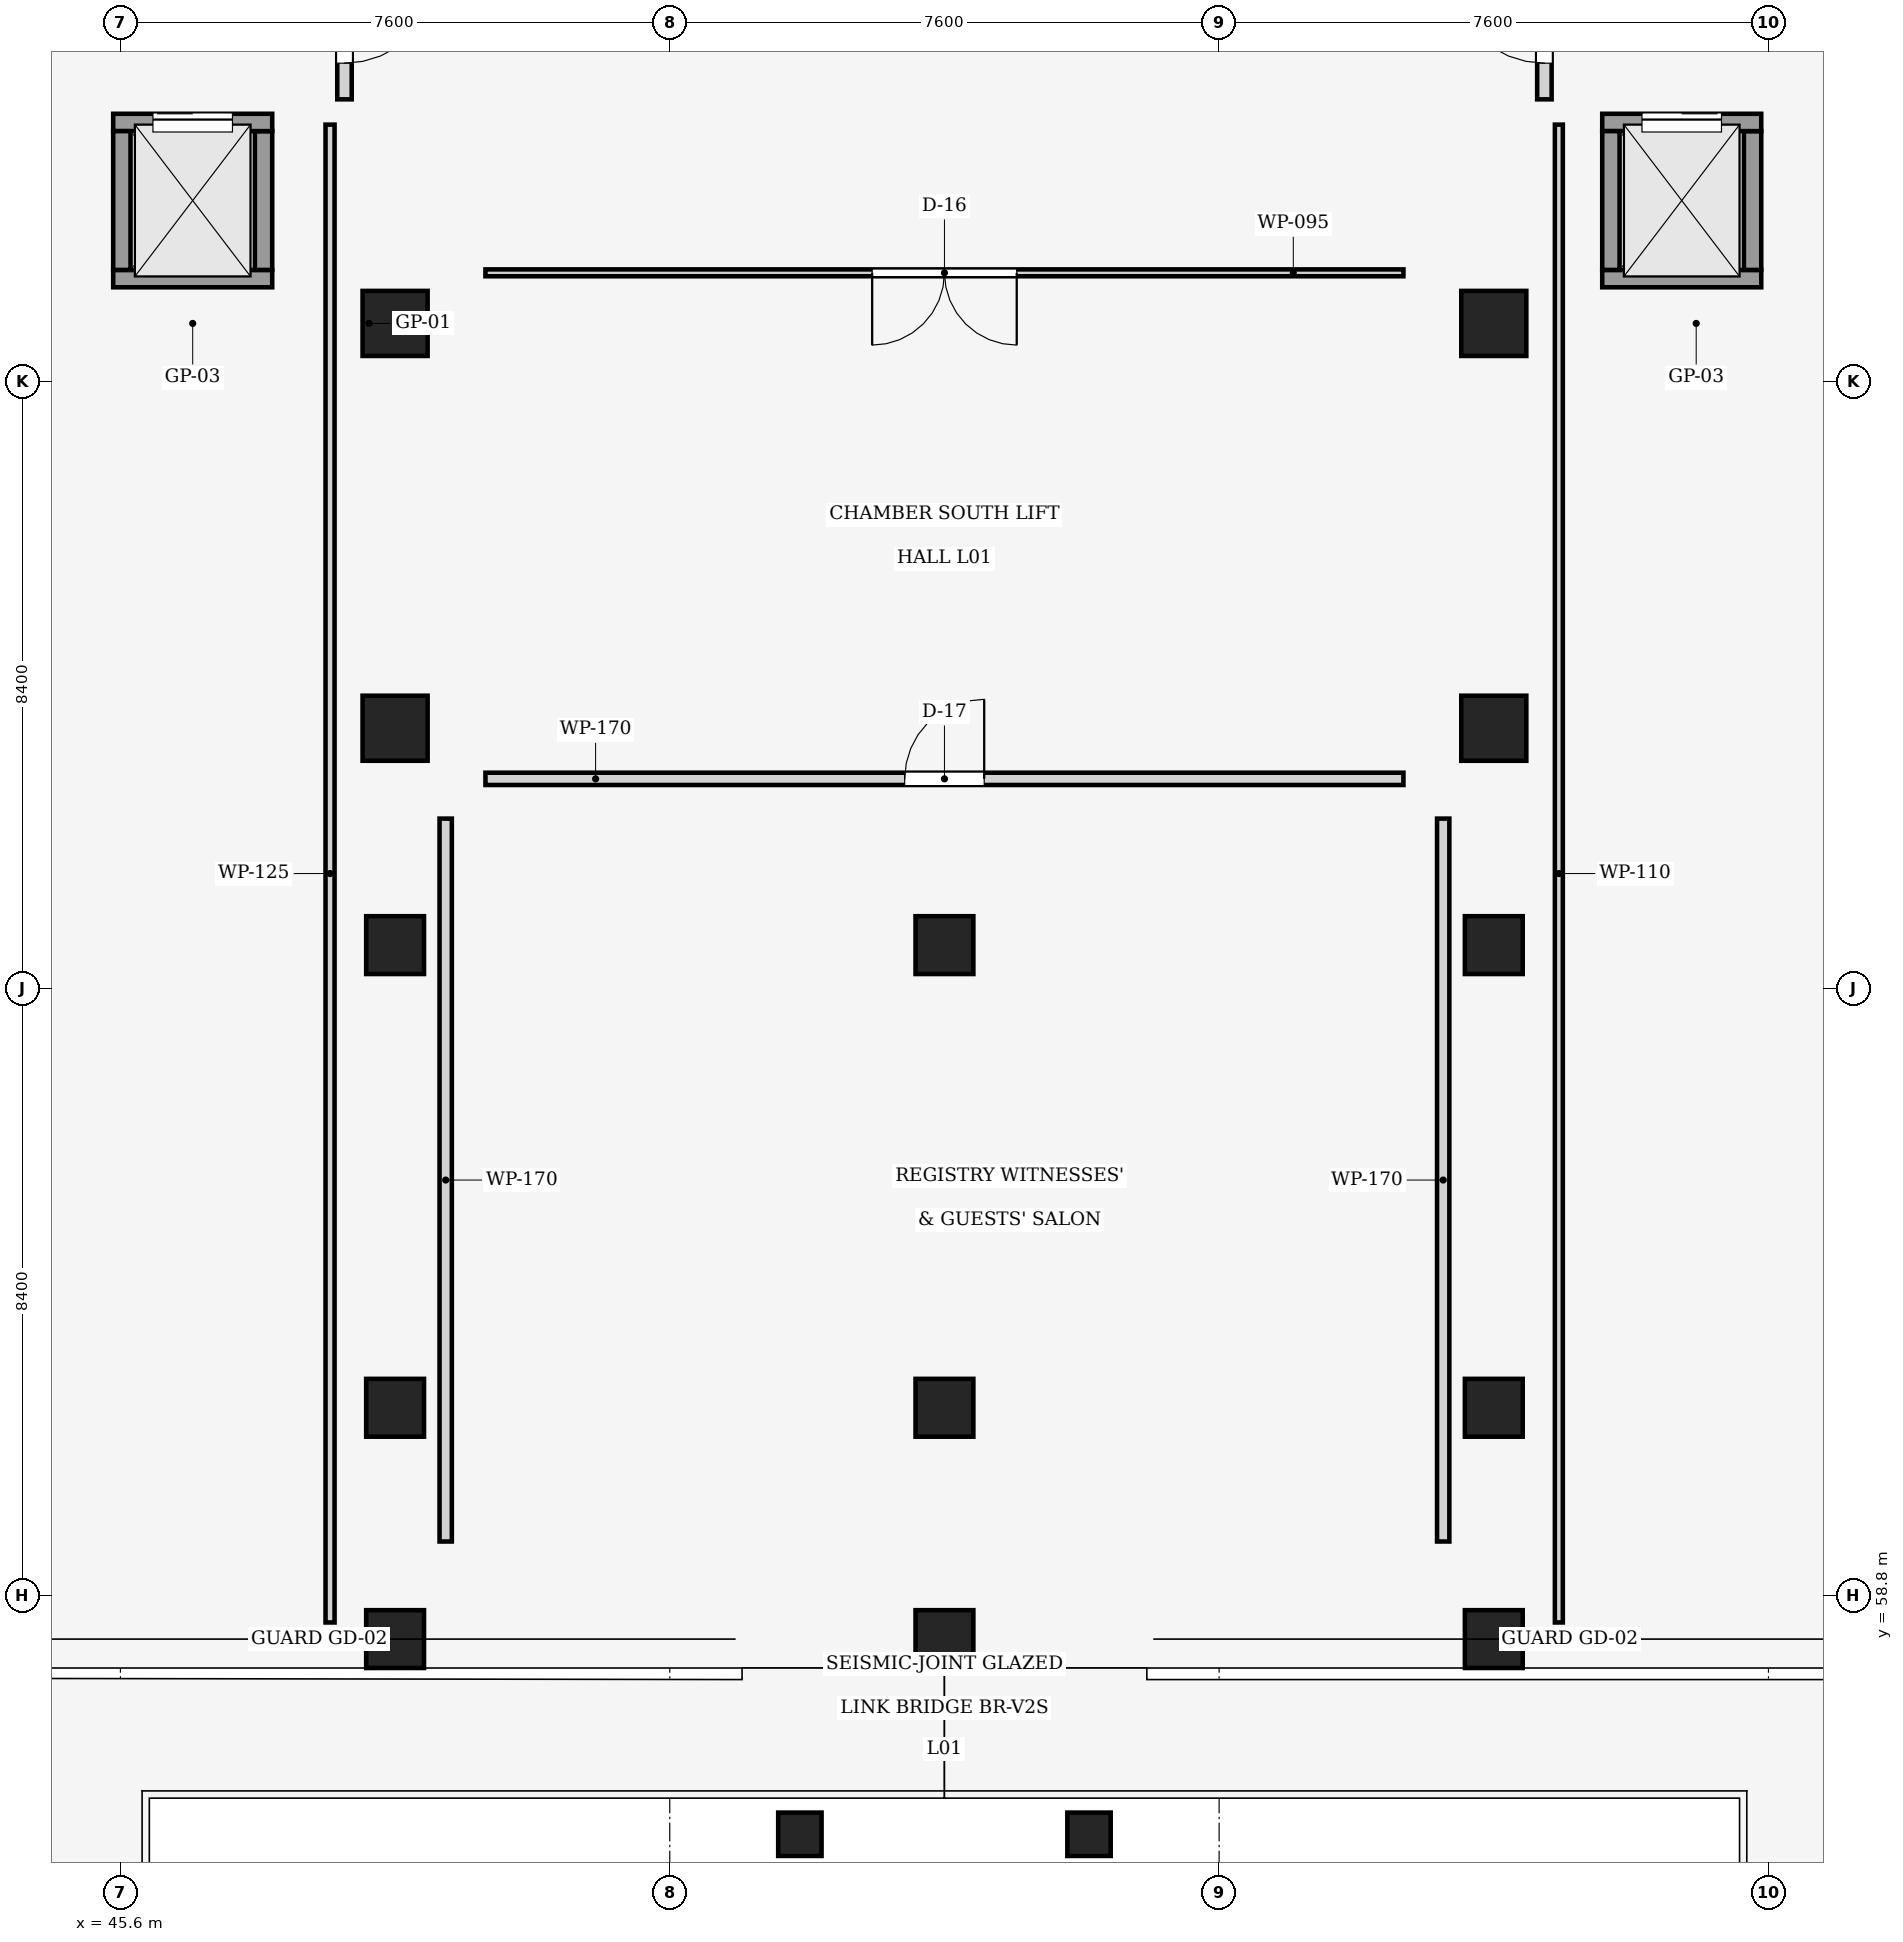
"""IFC4 building model, lengths in metres.
Left out: names, types, materials, properties, quantities, classifications, styles, units other than length and angle.
Written with IfcOpenShell. Run it as: python <this file> out.ifc"""

import sys

from ifc_helpers import new_model, si_unit, direction, frame, frame_2d, origin, origin_2d, place, context, subcontext, project, spatial, rectangle, extrude, element, fill, save


model = new_model("IFC4")
c1 = context("Model", 3, precision=1e-05, world=origin(), true_north=direction((0.0, 1.0)))
c2 = subcontext(c1, "Body", "Model", "MODEL_VIEW")
j1 = project(units=[si_unit("LENGTHUNIT", "METRE"), si_unit("PLANEANGLEUNIT", "RADIAN")], contexts=[c1])
p1 = place(None, origin())
s1 = spatial("IfcSite", under=j1, at=p1, CompositionType="ELEMENT")
p2 = place(p1, origin())
s2 = spatial("IfcBuilding", under=s1, at=p2, CompositionType="ELEMENT")
p3 = place(p2, frame((0.0, 0.0, 5.1)))
s3 = spatial("IfcBuildingStorey", under=s2, at=p3, CompositionType="ELEMENT", Elevation=5.1)
for number, where, z_axis, x_axis in (
    (1, (49.4, 70.8, 0.0), (0.0, 0.0, 1.0), (1.0, 0.0, 0.0)),
    (2, (49.4, 76.4, 0.0), (0.0, 0.0, 1.0), (1.0, 0.0, 0.0)),
    (3, (64.6, 70.8, 0.0), (0.0, 0.0, 1.0), (1.0, 0.0, 0.0)),
    (4, (64.6, 76.4, 0.0), (0.0, 0.0, 1.0), (1.0, 0.0, 0.0)),
):
    element("IfcColumn", number, at=place(p3, frame(where, z_axis=z_axis, x_axis=x_axis)), inside=s3, PredefinedType="COLUMN", context=c2, shape_type="SweptSolid", body=[
        extrude(rectangle(XDim=0.9, YDim=0.9, at=origin_2d()), origin(), (0.0, 0.0, 1.0), 4.05),
    ])
for number, where, z_axis, x_axis in (
    (5, (49.4, 67.8, 0.0), (0.0, 0.0, 1.0), (1.0, 0.0, 0.0)),
    (6, (57.0, 67.8, 0.0), (0.0, 0.0, 1.0), (1.0, 0.0, 0.0)),
    (7, (64.6, 67.8, 0.0), (0.0, 0.0, 1.0), (1.0, 0.0, 0.0)),
    (8, (49.4, 61.4, 0.0), (0.0, 0.0, 1.0), (1.0, 0.0, 0.0)),
    (9, (57.0, 61.4, 0.0), (0.0, 0.0, 1.0), (1.0, 0.0, 0.0)),
    (10, (64.6, 61.4, 0.0), (0.0, 0.0, 1.0), (1.0, 0.0, 0.0)),
    (11, (49.4, 58.2, 0.0), (0.0, 0.0, 1.0), (1.0, 0.0, 0.0)),
    (12, (57.0, 58.2, 0.0), (0.0, 0.0, 1.0), (1.0, 0.0, 0.0)),
    (13, (64.6, 58.2, 0.0), (0.0, 0.0, 1.0), (1.0, 0.0, 0.0)),
):
    element("IfcColumn", number, at=place(p3, frame(where, z_axis=z_axis, x_axis=x_axis)), inside=s3, PredefinedType="COLUMN", context=c2, shape_type="SweptSolid", body=[
        extrude(rectangle(XDim=0.8, YDim=0.8, at=origin_2d()), origin(), (0.0, 0.0, 1.0), 4.05),
    ])
for number, where, z_axis, x_axis in (
    (14, (55.0, 55.5, 0.0), (0.0, 0.0, 1.0), (1.0, 0.0, 0.0)),
    (15, (59.0, 55.5, 0.0), (0.0, 0.0, 1.0), (1.0, 0.0, 0.0)),
):
    element("IfcColumn", number, at=place(p3, frame(where, z_axis=z_axis, x_axis=x_axis)), inside=s3, PredefinedType="COLUMN", context=c2, shape_type="SweptSolid", body=[
        extrude(rectangle(XDim=0.6, YDim=0.6, at=origin_2d()), origin(), (0.0, 0.0, 1.0), 4.05),
    ])
p4 = place(p3, frame((47.7, 77.02, 0.0), z_axis=(0.0, 0.0, 1.0), x_axis=(-1.0, 0.0, 0.0)))
e16 = element("IfcWall", 16, at=p4, inside=s3, PredefinedType="SHEAR", context=c2, shape_type="SweptSolid", body=[
    extrude(rectangle(XDim=2.2, YDim=0.24, at=frame_2d((1.1, 0.0))), origin(), (0.0, 0.0, 1.0), 4.05),
])
p5 = place(p3, frame((47.58, 79.06, 0.0), z_axis=(0.0, 0.0, 1.0), x_axis=(0.0, -1.0, 0.0)))
e17 = element("IfcWall", 17, at=p5, inside=s3, PredefinedType="SHEAR", context=c2, shape_type="SweptSolid", body=[
    extrude(rectangle(XDim=1.92, YDim=0.24, at=frame_2d((0.96, 0.0))), origin(), (0.0, 0.0, 1.0), 4.05),
])
p6 = place(p3, frame((45.5, 79.18, 0.0), z_axis=(0.0, 0.0, 1.0), x_axis=(1.0, 0.0, 0.0)))
e18 = element("IfcWall", 18, at=p6, inside=s3, PredefinedType="SHEAR", context=c2, shape_type="SweptSolid", body=[
    extrude(rectangle(XDim=2.2, YDim=0.24, at=frame_2d((1.1, 0.0))), origin(), (0.0, 0.0, 1.0), 4.05),
])
p7 = place(p6, frame((0.55, 0.0, 0.0)))
e19 = element("IfcOpeningElement", 19, at=p7, cuts=e18, PredefinedType="OPENING", context=c2, shape_type="SweptSolid", body=[
    extrude(rectangle(XDim=1.1, YDim=2.15, at=frame_2d((0.55, 1.075))), frame((0.0, 0.13, 0.0), z_axis=(0.0, -1.0, 0.0), x_axis=(1.0, 0.0, 0.0)), (0.0, 0.0, 1.0), 0.26),
])
p8 = place(p3, frame((45.62, 77.14, 0.0), z_axis=(0.0, 0.0, 1.0), x_axis=(0.0, 1.0, 0.0)))
e20 = element("IfcWall", 20, at=p8, inside=s3, PredefinedType="SHEAR", context=c2, shape_type="SweptSolid", body=[
    extrude(rectangle(XDim=1.92, YDim=0.24, at=frame_2d((0.96, 0.0))), origin(), (0.0, 0.0, 1.0), 4.05),
])
p9 = place(p3, frame((48.7, 81.8, 0.0), z_axis=(0.0, 0.0, 1.0), x_axis=(0.0, -1.0, 0.0)))
e21 = element("IfcWall", 21, at=p9, inside=s3, PredefinedType="PARTITIONING", context=c2, shape_type="SweptSolid", body=[
    extrude(rectangle(XDim=2.3, YDim=0.2, at=frame_2d((1.15, 0.0))), origin(), (0.0, 0.0, 1.0), 2.9),
])
p10 = place(p9, frame((0.5, 0.0, 0.0)))
e22 = element("IfcOpeningElement", 22, at=p10, cuts=e21, PredefinedType="OPENING", context=c2, shape_type="SweptSolid", body=[
    extrude(rectangle(XDim=1.3, YDim=2.2, at=frame_2d((0.65, 1.1))), frame((0.0, 0.11, 0.0), z_axis=(0.0, -1.0, 0.0), x_axis=(1.0, 0.0, 0.0)), (0.0, 0.0, 1.0), 0.22),
])
p11 = place(p3, frame((68.3, 77.02, 0.0), z_axis=(0.0, 0.0, 1.0), x_axis=(-1.0, 0.0, 0.0)))
e23 = element("IfcWall", 23, at=p11, inside=s3, PredefinedType="SHEAR", context=c2, shape_type="SweptSolid", body=[
    extrude(rectangle(XDim=2.2, YDim=0.24, at=frame_2d((1.1, 0.0))), origin(), (0.0, 0.0, 1.0), 4.05),
])
p12 = place(p3, frame((68.18, 79.06, 0.0), z_axis=(0.0, 0.0, 1.0), x_axis=(0.0, -1.0, 0.0)))
e24 = element("IfcWall", 24, at=p12, inside=s3, PredefinedType="SHEAR", context=c2, shape_type="SweptSolid", body=[
    extrude(rectangle(XDim=1.92, YDim=0.24, at=frame_2d((0.96, 0.0))), origin(), (0.0, 0.0, 1.0), 4.05),
])
p13 = place(p3, frame((66.1, 79.18, 0.0), z_axis=(0.0, 0.0, 1.0), x_axis=(1.0, 0.0, 0.0)))
e25 = element("IfcWall", 25, at=p13, inside=s3, PredefinedType="SHEAR", context=c2, shape_type="SweptSolid", body=[
    extrude(rectangle(XDim=2.2, YDim=0.24, at=frame_2d((1.1, 0.0))), origin(), (0.0, 0.0, 1.0), 4.05),
])
p14 = place(p13, frame((0.55, 0.0, 0.0)))
e26 = element("IfcOpeningElement", 26, at=p14, cuts=e25, PredefinedType="OPENING", context=c2, shape_type="SweptSolid", body=[
    extrude(rectangle(XDim=1.1, YDim=2.15, at=frame_2d((0.55, 1.075))), frame((0.0, 0.13, 0.0), z_axis=(0.0, -1.0, 0.0), x_axis=(1.0, 0.0, 0.0)), (0.0, 0.0, 1.0), 0.26),
])
p15 = place(p3, frame((66.22, 77.14, 0.0), z_axis=(0.0, 0.0, 1.0), x_axis=(0.0, 1.0, 0.0)))
e27 = element("IfcWall", 27, at=p15, inside=s3, PredefinedType="SHEAR", context=c2, shape_type="SweptSolid", body=[
    extrude(rectangle(XDim=1.92, YDim=0.24, at=frame_2d((0.96, 0.0))), origin(), (0.0, 0.0, 1.0), 4.05),
])
p16 = place(p3, frame((65.3, 79.5, 0.0), z_axis=(0.0, 0.0, 1.0), x_axis=(0.0, 1.0, 0.0)))
e28 = element("IfcWall", 28, at=p16, inside=s3, PredefinedType="PARTITIONING", context=c2, shape_type="SweptSolid", body=[
    extrude(rectangle(XDim=2.3, YDim=0.2, at=frame_2d((1.15, 0.0))), origin(), (0.0, 0.0, 1.0), 2.9),
])
p17 = place(p16, frame((0.5, 0.0, 0.0)))
e29 = element("IfcOpeningElement", 29, at=p17, cuts=e28, PredefinedType="OPENING", context=c2, shape_type="SweptSolid", body=[
    extrude(rectangle(XDim=1.3, YDim=2.2, at=frame_2d((0.65, 1.1))), frame((0.0, 0.11, 0.0), z_axis=(0.0, -1.0, 0.0), x_axis=(1.0, 0.0, 0.0)), (0.0, 0.0, 1.0), 0.22),
])
p18 = place(p3, frame((48.5, 79.15, 0.0), z_axis=(0.0, 0.0, 1.0), x_axis=(0.0, -1.0, 0.0)))
e30 = element("IfcWall", 30, at=p18, inside=s3, PredefinedType="PARTITIONING", context=c2, shape_type="SweptSolid", body=[
    extrude(rectangle(XDim=20.72, YDim=0.125, at=frame_2d((10.36, 0.0))), origin(), (0.0, 0.0, 1.0), 2.995),
])
p19 = place(p3, frame((65.5, 58.43, 0.0), z_axis=(0.0, 0.0, 1.0), x_axis=(0.0, 1.0, 0.0)))
e31 = element("IfcWall", 31, at=p19, inside=s3, PredefinedType="PARTITIONING", context=c2, shape_type="SweptSolid", body=[
    extrude(rectangle(XDim=20.72, YDim=0.11, at=frame_2d((10.36, 0.0))), origin(), (0.0, 0.0, 1.0), 2.995),
])
p20 = place(p3, frame((63.35, 77.1, 0.0), z_axis=(0.0, 0.0, 1.0), x_axis=(-1.0, 0.0, 0.0)))
e32 = element("IfcWall", 32, at=p20, inside=s3, PredefinedType="PARTITIONING", context=c2, shape_type="SweptSolid", body=[
    extrude(rectangle(XDim=12.7, YDim=0.095, at=frame_2d((6.35, 0.0))), origin(), (0.0, 0.0, 1.0), 3.345),
])
p21 = place(p20, frame((5.35, 0.0, 0.0)))
e33 = element("IfcOpeningElement", 33, at=p21, cuts=e32, PredefinedType="OPENING", context=c2, shape_type="SweptSolid", body=[
    extrude(rectangle(XDim=2.0, YDim=2.22, at=frame_2d((1.0, 1.11))), frame((0.0, 0.057, 0.0), z_axis=(0.0, -1.0, 0.0), x_axis=(1.0, 0.0, 0.0)), (0.0, 0.0, 1.0), 0.115),
])
p22 = place(p3, frame((50.65, 70.1, 0.0), z_axis=(0.0, 0.0, 1.0), x_axis=(1.0, 0.0, 0.0)))
e34 = element("IfcWall", 34, at=p22, inside=s3, PredefinedType="PARTITIONING", context=c2, shape_type="SweptSolid", body=[
    extrude(rectangle(XDim=12.7, YDim=0.17, at=frame_2d((6.35, 0.0))), origin(), (0.0, 0.0, 1.0), 3.68),
])
p23 = place(p22, frame((5.8, 0.0, 0.0)))
e35 = element("IfcOpeningElement", 35, at=p23, cuts=e34, PredefinedType="OPENING", context=c2, shape_type="SweptSolid", body=[
    extrude(rectangle(XDim=1.1, YDim=2.35, at=frame_2d((0.55, 1.175))), frame((0.0, 0.095, 0.0), z_axis=(0.0, -1.0, 0.0), x_axis=(1.0, 0.0, 0.0)), (0.0, 0.0, 1.0), 0.19),
])
for number, where, z_axis, x_axis in (
    (36, (63.9, 69.55, 0.0), (0.0, 0.0, 1.0), (0.0, -1.0, 0.0)),
    (37, (50.1, 59.55, 0.0), (0.0, 0.0, 1.0), (0.0, 1.0, 0.0)),
):
    element("IfcWall", number, at=place(p3, frame(where, z_axis=z_axis, x_axis=x_axis)), inside=s3, PredefinedType="PARTITIONING", context=c2, shape_type="SweptSolid", body=[
        extrude(rectangle(XDim=10.0, YDim=0.17, at=frame_2d((5.0, 0.0))), origin(), (0.0, 0.0, 1.0), 3.145),
    ])
p24 = place(p7, origin())
e38 = element("IfcDoor", 38, at=p24, inside=s3, OperationType="SLIDING_TO_LEFT", PredefinedType="DOOR", context=c2, shape_type="SweptSolid", body=[
    extrude(rectangle(XDim=1.1, YDim=2.15, at=frame_2d((0.55, 1.075))), frame((0.0, 0.025, 0.0), z_axis=(0.0, -1.0, 0.0), x_axis=(1.0, 0.0, 0.0)), (0.0, 0.0, 1.0), 0.05),
])
fill(e19, e38)
p25 = place(p10, origin())
e39 = element("IfcDoor", 39, at=p25, inside=s3, OperationType="SINGLE_SWING_LEFT", PredefinedType="DOOR", context=c2, shape_type="SweptSolid", body=[
    extrude(rectangle(XDim=1.3, YDim=2.2, at=frame_2d((0.65, 1.1))), frame((0.0, 0.025, 0.0), z_axis=(0.0, -1.0, 0.0), x_axis=(1.0, 0.0, 0.0)), (0.0, 0.0, 1.0), 0.05),
])
fill(e22, e39)
p26 = place(p14, origin())
e40 = element("IfcDoor", 40, at=p26, inside=s3, OperationType="SLIDING_TO_RIGHT", PredefinedType="DOOR", context=c2, shape_type="SweptSolid", body=[
    extrude(rectangle(XDim=1.1, YDim=2.15, at=frame_2d((0.55, 1.075))), frame((0.0, 0.025, 0.0), z_axis=(0.0, -1.0, 0.0), x_axis=(1.0, 0.0, 0.0)), (0.0, 0.0, 1.0), 0.05),
])
fill(e26, e40)
p27 = place(p17, origin())
e41 = element("IfcDoor", 41, at=p27, inside=s3, OperationType="SINGLE_SWING_RIGHT", PredefinedType="DOOR", context=c2, shape_type="SweptSolid", body=[
    extrude(rectangle(XDim=1.3, YDim=2.2, at=frame_2d((0.65, 1.1))), frame((0.0, 0.025, 0.0), z_axis=(0.0, -1.0, 0.0), x_axis=(1.0, 0.0, 0.0)), (0.0, 0.0, 1.0), 0.05),
])
fill(e29, e41)
p28 = place(p21, origin())
e42 = element("IfcDoor", 42, at=p28, inside=s3, OperationType="DOUBLE_DOOR_SINGLE_SWING", PredefinedType="DOOR", context=c2, shape_type="SweptSolid", body=[
    extrude(rectangle(XDim=2.0, YDim=2.22, at=frame_2d((1.0, 1.11))), frame((0.0, 0.025, 0.0), z_axis=(0.0, -1.0, 0.0), x_axis=(1.0, 0.0, 0.0)), (0.0, 0.0, 1.0), 0.05),
])
fill(e33, e42)
p29 = place(p23, origin())
e43 = element("IfcDoor", 43, at=p29, inside=s3, OperationType="SINGLE_SWING_RIGHT", PredefinedType="DOOR", context=c2, shape_type="SweptSolid", body=[
    extrude(rectangle(XDim=1.1, YDim=2.35, at=frame_2d((0.55, 1.175))), frame((0.0, 0.025, 0.0), z_axis=(0.0, -1.0, 0.0), x_axis=(1.0, 0.0, 0.0)), (0.0, 0.0, 1.0), 0.05),
])
fill(e35, e43)
save(model, sys.argv[1])
